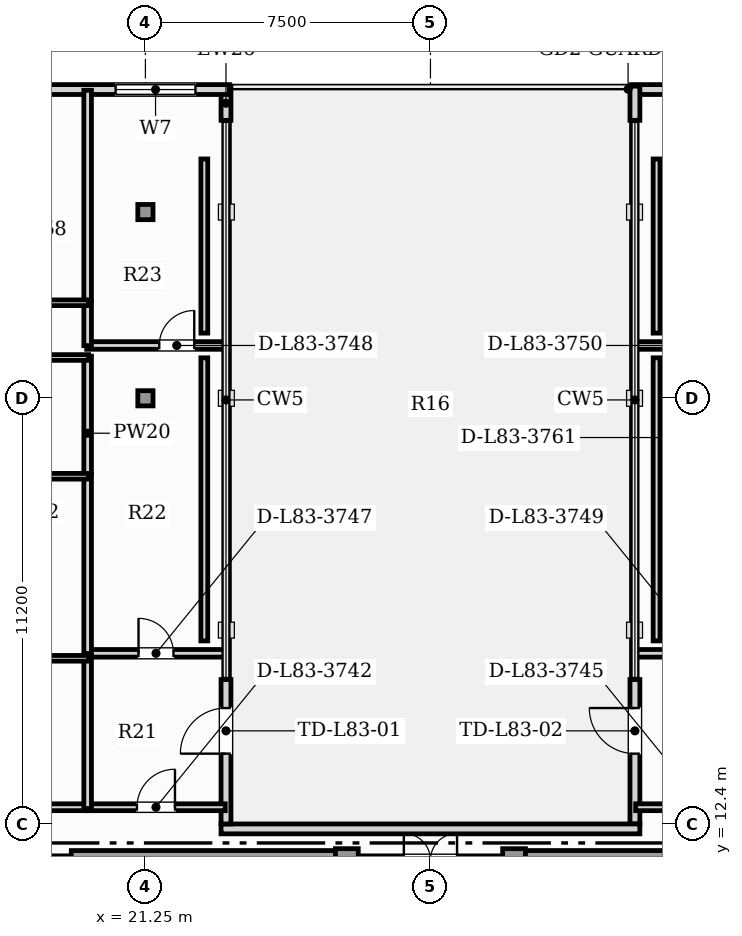
"""IFC4 building model, lengths in metres.
Left out: names, types, materials, properties, quantities, classifications, styles, units other than length and angle.
Written with IfcOpenShell. Run it as: python <this file> out.ifc"""

import sys

from ifc_helpers import new_model, si_unit, direction, frame, frame_2d, origin, origin_2d, place, context, subcontext, project, spatial, rectangle, hollow_rectangle, extrude, element, fill, save


model = new_model("IFC4")
c1 = context("Model", 3, precision=1e-05, world=origin(), true_north=direction((0.0, 1.0)))
c2 = subcontext(c1, "Body", "Model", "MODEL_VIEW")
j1 = project(units=[si_unit("LENGTHUNIT", "METRE"), si_unit("PLANEANGLEUNIT", "RADIAN")], contexts=[c1])
p1 = place(None, origin())
s1 = spatial("IfcSite", under=j1, at=p1, CompositionType="ELEMENT")
p2 = place(p1, origin())
s2 = spatial("IfcBuilding", under=s1, at=p2, CompositionType="ELEMENT")
p3 = place(p2, frame((0.0, 0.0, 337.5)))
s3 = spatial("IfcBuildingStorey", under=s2, at=p3, CompositionType="ELEMENT", Elevation=337.5)
for number, where, z_axis, x_axis in (
    (1, (19.3, 11.45, 0.0), (0.0, 0.0, 1.0), (1.0, 0.0, 0.0)),
    (2, (30.9, 11.45, 0.0), (0.0, 0.0, 1.0), (1.0, 0.0, 0.0)),
):
    element("IfcWall", number, at=place(p3, frame(where, z_axis=z_axis, x_axis=x_axis)), inside=s3, PredefinedType="SHEAR", context=c2, shape_type="SweptSolid", body=[
        extrude(rectangle(XDim=7.3, YDim=0.5, at=frame_2d((3.65, 0.0))), origin(), (0.0, 0.0, 1.0), 3.63),
    ])
for number, where, z_axis, x_axis in (
    (3, (26.55, 11.45, 0.0), (0.0, 0.0, 1.0), (1.0, 0.0, 0.0)),
    (4, (30.95, 11.45, 0.0), (0.0, 0.0, 1.0), (1.0, 0.0, 0.0)),
):
    element("IfcColumn", number, at=place(p3, frame(where, z_axis=z_axis, x_axis=x_axis)), inside=s3, PredefinedType="COLUMN", context=c2, shape_type="SweptSolid", body=[
        extrude(rectangle(XDim=0.6, YDim=0.6, at=origin_2d()), origin(), (0.0, 0.0, 1.0), 3.85),
    ])
for number, where, z_axis, x_axis in (
    (5, (21.25, 23.6, 0.0), (0.0, 0.0, 1.0), (1.0, 0.0, 0.0)),
    (6, (21.25, 28.5, 0.0), (0.0, 0.0, 1.0), (1.0, 0.0, 0.0)),
):
    element("IfcColumn", number, at=place(p3, frame(where, z_axis=z_axis, x_axis=x_axis)), inside=s3, PredefinedType="COLUMN", context=c2, shape_type="SweptSolid", body=[
        extrude(hollow_rectangle(XDim=0.4, YDim=0.4, WallThickness=0.02, at=origin_2d()), origin(), (0.0, 0.0, 1.0), 3.85),
    ])
p4 = place(p3, frame((44.912, 31.724, 0.0), z_axis=(0.0, 0.0, 1.0), x_axis=(-1.0, 0.0, 0.0)))
e7 = element("IfcWall", 7, at=p4, inside=s3, PredefinedType="SOLIDWALL", context=c2, shape_type="SweptSolid", body=[
    extrude(rectangle(XDim=10.872, YDim=0.26, at=frame_2d((5.436, 0.0))), origin(), (0.0, 0.0, 1.0), 3.63),
])
p5 = place(p4, frame((7.878, 0.0, 0.85)))
e8 = element("IfcOpeningElement", 8, at=p5, cuts=e7, PredefinedType="OPENING", context=c2, shape_type="SweptSolid", body=[
    extrude(rectangle(XDim=2.1, YDim=2.05, at=frame_2d((1.05, 1.025))), frame((0.0, 0.14, 0.0), z_axis=(0.0, -1.0, 0.0), x_axis=(1.0, 0.0, 0.0)), (0.0, 0.0, 1.0), 0.28),
])
p6 = place(p4, frame((4.502, 0.0, 0.9)))
e9 = element("IfcOpeningElement", 9, at=p6, cuts=e7, PredefinedType="OPENING", context=c2, shape_type="SweptSolid", body=[
    extrude(rectangle(XDim=1.5, YDim=1.95, at=frame_2d((0.75, 0.975))), frame((0.0, 0.14, 0.0), z_axis=(0.0, -1.0, 0.0), x_axis=(1.0, 0.0, 0.0)), (0.0, 0.0, 1.0), 0.28),
])
p7 = place(p4, frame((1.617, 0.0, 0.9)))
e10 = element("IfcOpeningElement", 10, at=p7, cuts=e7, PredefinedType="OPENING", context=c2, shape_type="SweptSolid", body=[
    extrude(rectangle(XDim=1.5, YDim=1.95, at=frame_2d((0.75, 0.975))), frame((0.0, 0.14, 0.0), z_axis=(0.0, -1.0, 0.0), x_axis=(1.0, 0.0, 0.0)), (0.0, 0.0, 1.0), 0.28),
])
p8 = place(p3, frame((34.13, 12.4, 0.0), z_axis=(0.0, 0.0, 1.0), x_axis=(0.0, 1.0, 0.0)))
e11 = element("IfcWall", 11, at=p8, inside=s3, PredefinedType="SOLIDWALL", context=c2, shape_type="SweptSolid", body=[
    extrude(rectangle(XDim=3.8, YDim=0.26, at=frame_2d((1.9, 0.0))), origin(), (0.0, 0.0, 1.0), 3.17),
])
p9 = place(p8, frame((1.85, 0.0, 0.0)))
e12 = element("IfcOpeningElement", 12, at=p9, cuts=e11, PredefinedType="OPENING", context=c2, shape_type="SweptSolid", body=[
    extrude(rectangle(XDim=1.2, YDim=2.2, at=frame_2d((0.6, 1.1))), frame((0.0, 0.14, 0.0), z_axis=(0.0, -1.0, 0.0), x_axis=(1.0, 0.0, 0.0)), (0.0, 0.0, 1.0), 0.28),
])
p10 = place(p3, frame((34.13, 30.914, 0.0), z_axis=(0.0, 0.0, 1.0), x_axis=(0.0, 1.0, 0.0)))
e13 = element("IfcWall", 13, at=p10, inside=s3, PredefinedType="SOLIDWALL", context=c2, shape_type="SweptSolid", body=[
    extrude(rectangle(XDim=0.9, YDim=0.26, at=frame_2d((0.45, 0.0))), origin(), (0.0, 0.0, 1.0), 3.63),
])
p11 = place(p3, frame((34.26, 12.27, 0.0), z_axis=(0.0, 0.0, 1.0), x_axis=(-1.0, 0.0, 0.0)))
e14 = element("IfcWall", 14, at=p11, inside=s3, PredefinedType="SOLIDWALL", context=c2, shape_type="SweptSolid", body=[
    extrude(rectangle(XDim=11.02, YDim=0.26, at=frame_2d((5.51, 0.0))), origin(), (0.0, 0.0, 1.0), 3.63),
])
p12 = place(p3, frame((23.37, 12.4, 0.0), z_axis=(0.0, 0.0, 1.0), x_axis=(0.0, 1.0, 0.0)))
e15 = element("IfcWall", 15, at=p12, inside=s3, PredefinedType="SOLIDWALL", context=c2, shape_type="SweptSolid", body=[
    extrude(rectangle(XDim=3.8, YDim=0.26, at=frame_2d((1.9, 0.0))), origin(), (0.0, 0.0, 1.0), 3.17),
])
p13 = place(p12, frame((1.85, 0.0, 0.0)))
e16 = element("IfcOpeningElement", 16, at=p13, cuts=e15, PredefinedType="OPENING", context=c2, shape_type="SweptSolid", body=[
    extrude(rectangle(XDim=1.2, YDim=2.2, at=frame_2d((0.6, 1.1))), frame((0.0, 0.14, 0.0), z_axis=(0.0, -1.0, 0.0), x_axis=(1.0, 0.0, 0.0)), (0.0, 0.0, 1.0), 0.28),
])
p14 = place(p3, frame((23.37, 30.914, 0.0), z_axis=(0.0, 0.0, 1.0), x_axis=(0.0, 1.0, 0.0)))
e17 = element("IfcWall", 17, at=p14, inside=s3, PredefinedType="SOLIDWALL", context=c2, shape_type="SweptSolid", body=[
    extrude(rectangle(XDim=0.9, YDim=0.26, at=frame_2d((0.45, 0.0))), origin(), (0.0, 0.0, 1.0), 3.63),
])
p15 = place(p3, frame((23.46, 31.724, 0.0), z_axis=(0.0, 0.0, 1.0), x_axis=(-1.0, 0.0, 0.0)))
e18 = element("IfcWall", 18, at=p15, inside=s3, PredefinedType="SOLIDWALL", context=c2, shape_type="SweptSolid", body=[
    extrude(rectangle(XDim=10.872, YDim=0.26, at=frame_2d((5.436, 0.0))), origin(), (0.0, 0.0, 1.0), 3.63),
])
p16 = place(p15, frame((0.893, 0.0, 0.85)))
e19 = element("IfcOpeningElement", 19, at=p16, cuts=e18, PredefinedType="OPENING", context=c2, shape_type="SweptSolid", body=[
    extrude(rectangle(XDim=2.1, YDim=2.05, at=frame_2d((1.05, 1.025))), frame((0.0, 0.14, 0.0), z_axis=(0.0, -1.0, 0.0), x_axis=(1.0, 0.0, 0.0)), (0.0, 0.0, 1.0), 0.28),
])
p17 = place(p15, frame((8.602, 0.0, 0.9)))
e20 = element("IfcOpeningElement", 20, at=p17, cuts=e18, PredefinedType="OPENING", context=c2, shape_type="SweptSolid", body=[
    extrude(rectangle(XDim=1.5, YDim=1.95, at=frame_2d((0.75, 0.975))), frame((0.0, 0.14, 0.0), z_axis=(0.0, -1.0, 0.0), x_axis=(1.0, 0.0, 0.0)), (0.0, 0.0, 1.0), 0.28),
])
p18 = place(p15, frame((6.336, 0.0, 0.9)))
e21 = element("IfcOpeningElement", 21, at=p18, cuts=e18, PredefinedType="OPENING", context=c2, shape_type="SweptSolid", body=[
    extrude(rectangle(XDim=0.9, YDim=1.4, at=frame_2d((0.45, 0.7))), frame((0.0, 0.14, 0.0), z_axis=(0.0, -1.0, 0.0), x_axis=(1.0, 0.0, 0.0)), (0.0, 0.0, 1.0), 0.28),
])
p19 = place(p3, frame((16.23, 11.45, 0.0), z_axis=(0.0, 0.0, 1.0), x_axis=(1.0, 0.0, 0.0)))
e22 = element("IfcWall", 22, at=p19, inside=s3, PredefinedType="SOLIDWALL", context=c2, shape_type="SweptSolid", body=[
    extrude(rectangle(XDim=3.04, YDim=0.22, at=frame_2d((1.52, 0.0))), origin(), (0.0, 0.0, 1.0), 3.63),
])
p20 = place(p19, frame((0.97, 0.0, 0.0)))
e23 = element("IfcOpeningElement", 23, at=p20, cuts=e22, PredefinedType="OPENING", context=c2, shape_type="SweptSolid", body=[
    extrude(rectangle(XDim=1.1, YDim=2.2, at=frame_2d((0.55, 1.1))), frame((0.0, 0.12, 0.0), z_axis=(0.0, -1.0, 0.0), x_axis=(1.0, 0.0, 0.0)), (0.0, 0.0, 1.0), 0.24),
])
p21 = place(p3, frame((26.63, 11.45, 0.0), z_axis=(0.0, 0.0, 1.0), x_axis=(1.0, 0.0, 0.0)))
e24 = element("IfcWall", 24, at=p21, inside=s3, PredefinedType="SOLIDWALL", context=c2, shape_type="SweptSolid", body=[
    extrude(rectangle(XDim=4.24, YDim=0.22, at=frame_2d((2.12, 0.0))), origin(), (0.0, 0.0, 1.0), 3.63),
])
p22 = place(p21, frame((1.42, 0.0, 0.0)))
e25 = element("IfcOpeningElement", 25, at=p22, cuts=e24, PredefinedType="OPENING", context=c2, shape_type="SweptSolid", body=[
    extrude(rectangle(XDim=1.4, YDim=2.2, at=frame_2d((0.7, 1.1))), frame((0.0, 0.12, 0.0), z_axis=(0.0, -1.0, 0.0), x_axis=(1.0, 0.0, 0.0)), (0.0, 0.0, 1.0), 0.24),
])
p23 = place(p3, frame((19.705, 12.84, 0.0), z_axis=(0.0, 0.0, 1.0), x_axis=(1.0, 0.0, 0.0)))
e26 = element("IfcWall", 26, at=p23, inside=s3, PredefinedType="PARTITIONING", context=c2, shape_type="SweptSolid", body=[
    extrude(rectangle(XDim=3.646, YDim=0.18, at=frame_2d((1.823, 0.0))), origin(), (0.0, 0.0, 1.0), 3.63),
])
p24 = place(p23, frame((1.323, 0.0, 0.0)))
e27 = element("IfcOpeningElement", 27, at=p24, cuts=e26, PredefinedType="OPENING", context=c2, shape_type="SweptSolid", body=[
    extrude(rectangle(XDim=1.0, YDim=2.15, at=frame_2d((0.5, 1.075))), frame((0.0, 0.1, 0.0), z_axis=(0.0, -1.0, 0.0), x_axis=(1.0, 0.0, 0.0)), (0.0, 0.0, 1.0), 0.2),
])
p25 = place(p3, frame((17.138, 12.84, 0.0), z_axis=(0.0, 0.0, 1.0), x_axis=(1.0, 0.0, 0.0)))
e28 = element("IfcWall", 28, at=p25, inside=s3, PredefinedType="PARTITIONING", context=c2, shape_type="SweptSolid", body=[
    extrude(rectangle(XDim=2.537, YDim=0.18, at=frame_2d((1.269, 0.0))), origin(), (0.0, 0.0, 1.0), 3.63),
])
p26 = place(p3, frame((34.149, 12.84, 0.0), z_axis=(0.0, 0.0, 1.0), x_axis=(1.0, 0.0, 0.0)))
e29 = element("IfcWall", 29, at=p26, inside=s3, PredefinedType="PARTITIONING", context=c2, shape_type="SweptSolid", body=[
    extrude(rectangle(XDim=3.646, YDim=0.18, at=frame_2d((1.823, 0.0))), origin(), (0.0, 0.0, 1.0), 3.63),
])
p27 = place(p26, frame((1.323, 0.0, 0.0)))
e30 = element("IfcOpeningElement", 30, at=p27, cuts=e29, PredefinedType="OPENING", context=c2, shape_type="SweptSolid", body=[
    extrude(rectangle(XDim=1.0, YDim=2.15, at=frame_2d((0.5, 1.075))), frame((0.0, 0.1, 0.0), z_axis=(0.0, -1.0, 0.0), x_axis=(1.0, 0.0, 0.0)), (0.0, 0.0, 1.0), 0.2),
])
p28 = place(p3, frame((19.705, 16.89, 0.0), z_axis=(0.0, 0.0, 1.0), x_axis=(1.0, 0.0, 0.0)))
e31 = element("IfcWall", 31, at=p28, inside=s3, PredefinedType="PARTITIONING", context=c2, shape_type="SweptSolid", body=[
    extrude(rectangle(XDim=3.647, YDim=0.2, at=frame_2d((1.823, 0.0))), origin(), (0.0, 0.0, 1.0), 3.63),
])
p29 = place(p28, frame((1.364, 0.0, 0.0)))
e32 = element("IfcOpeningElement", 32, at=p29, cuts=e31, PredefinedType="OPENING", context=c2, shape_type="SweptSolid", body=[
    extrude(rectangle(XDim=0.92, YDim=2.1, at=frame_2d((0.46, 1.05))), frame((0.0, 0.11, 0.0), z_axis=(0.0, -1.0, 0.0), x_axis=(1.0, 0.0, 0.0)), (0.0, 0.0, 1.0), 0.22),
])
p30 = place(p3, frame((19.73, 12.805, 0.0), z_axis=(0.0, 0.0, 1.0), x_axis=(0.0, 1.0, 0.0)))
e33 = element("IfcWall", 33, at=p30, inside=s3, PredefinedType="PARTITIONING", context=c2, shape_type="SweptSolid", body=[
    extrude(rectangle(XDim=3.989, YDim=0.2, at=frame_2d((1.995, 0.0))), origin(), (0.0, 0.0, 1.0), 3.63),
])
p31 = place(p3, frame((19.705, 24.99, 0.0), z_axis=(0.0, 0.0, 1.0), x_axis=(1.0, 0.0, 0.0)))
e34 = element("IfcWall", 34, at=p31, inside=s3, PredefinedType="PARTITIONING", context=c2, shape_type="SweptSolid", body=[
    extrude(rectangle(XDim=3.646, YDim=0.2, at=frame_2d((1.823, 0.0))), origin(), (0.0, 0.0, 1.0), 3.63),
])
p32 = place(p31, frame((1.91, 0.0, 0.0)))
e35 = element("IfcOpeningElement", 35, at=p32, cuts=e34, PredefinedType="OPENING", context=c2, shape_type="SweptSolid", body=[
    extrude(rectangle(XDim=0.92, YDim=2.1, at=frame_2d((0.46, 1.05))), frame((0.0, 0.11, 0.0), z_axis=(0.0, -1.0, 0.0), x_axis=(1.0, 0.0, 0.0)), (0.0, 0.0, 1.0), 0.22),
])
p33 = place(p3, frame((19.73, 16.885, 0.0), z_axis=(0.0, 0.0, 1.0), x_axis=(0.0, 1.0, 0.0)))
e36 = element("IfcWall", 36, at=p33, inside=s3, PredefinedType="PARTITIONING", context=c2, shape_type="SweptSolid", body=[
    extrude(rectangle(XDim=4.698, YDim=0.2, at=frame_2d((2.349, 0.0))), origin(), (0.0, 0.0, 1.0), 3.63),
])
p34 = place(p3, frame((19.73, 21.614, 0.0), z_axis=(0.0, 0.0, 1.0), x_axis=(0.0, 1.0, 0.0)))
e37 = element("IfcWall", 37, at=p34, inside=s3, PredefinedType="PARTITIONING", context=c2, shape_type="SweptSolid", body=[
    extrude(rectangle(XDim=3.095, YDim=0.2, at=frame_2d((1.548, 0.0))), origin(), (0.0, 0.0, 1.0), 3.63),
])
p35 = place(p3, frame((19.73, 24.985, 0.0), z_axis=(0.0, 0.0, 1.0), x_axis=(0.0, 1.0, 0.0)))
e38 = element("IfcWall", 38, at=p35, inside=s3, PredefinedType="PARTITIONING", context=c2, shape_type="SweptSolid", body=[
    extrude(rectangle(XDim=1.164, YDim=0.2, at=frame_2d((0.582, 0.0))), origin(), (0.0, 0.0, 1.0), 3.63),
])
p36 = place(p3, frame((19.73, 26.179, 0.0), z_axis=(0.0, 0.0, 1.0), x_axis=(0.0, 1.0, 0.0)))
e39 = element("IfcWall", 39, at=p36, inside=s3, PredefinedType="PARTITIONING", context=c2, shape_type="SweptSolid", body=[
    extrude(rectangle(XDim=5.526, YDim=0.2, at=frame_2d((2.763, 0.0))), origin(), (0.0, 0.0, 1.0), 3.63),
])
p37 = place(p3, frame((34.148, 16.89, 0.0), z_axis=(0.0, 0.0, 1.0), x_axis=(1.0, 0.0, 0.0)))
e40 = element("IfcWall", 40, at=p37, inside=s3, PredefinedType="PARTITIONING", context=c2, shape_type="SweptSolid", body=[
    extrude(rectangle(XDim=3.647, YDim=0.2, at=frame_2d((1.823, 0.0))), origin(), (0.0, 0.0, 1.0), 3.63),
])
p38 = place(p37, frame((1.364, 0.0, 0.0)))
e41 = element("IfcOpeningElement", 41, at=p38, cuts=e40, PredefinedType="OPENING", context=c2, shape_type="SweptSolid", body=[
    extrude(rectangle(XDim=0.92, YDim=2.1, at=frame_2d((0.46, 1.05))), frame((0.0, 0.11, 0.0), z_axis=(0.0, -1.0, 0.0), x_axis=(1.0, 0.0, 0.0)), (0.0, 0.0, 1.0), 0.22),
])
p39 = place(p3, frame((34.149, 24.99, 0.0), z_axis=(0.0, 0.0, 1.0), x_axis=(1.0, 0.0, 0.0)))
e42 = element("IfcWall", 42, at=p39, inside=s3, PredefinedType="PARTITIONING", context=c2, shape_type="SweptSolid", body=[
    extrude(rectangle(XDim=3.646, YDim=0.2, at=frame_2d((1.823, 0.0))), origin(), (0.0, 0.0, 1.0), 3.63),
])
p40 = place(p39, frame((0.816, 0.0, 0.0)))
e43 = element("IfcOpeningElement", 43, at=p40, cuts=e42, PredefinedType="OPENING", context=c2, shape_type="SweptSolid", body=[
    extrude(rectangle(XDim=0.92, YDim=2.1, at=frame_2d((0.46, 1.05))), frame((0.0, 0.11, 0.0), z_axis=(0.0, -1.0, 0.0), x_axis=(1.0, 0.0, 0.0)), (0.0, 0.0, 1.0), 0.22),
])
p41 = place(p3, frame((17.038, 24.674, 0.0), z_axis=(0.0, 0.0, 1.0), x_axis=(1.0, 0.0, 0.0)))
e44 = element("IfcWall", 44, at=p41, inside=s3, PredefinedType="PARTITIONING", context=c2, shape_type="SweptSolid", body=[
    extrude(rectangle(XDim=2.717, YDim=0.15, at=frame_2d((1.358, 0.0))), origin(), (0.0, 0.0, 1.0), 3.63),
])
p42 = place(p3, frame((15.557, 26.114, 0.0), z_axis=(0.0, 0.0, 1.0), x_axis=(1.0, 0.0, 0.0)))
e45 = element("IfcWall", 45, at=p42, inside=s3, PredefinedType="PARTITIONING", context=c2, shape_type="SweptSolid", body=[
    extrude(rectangle(XDim=4.198, YDim=0.15, at=frame_2d((2.099, 0.0))), origin(), (0.0, 0.0, 1.0), 3.63),
])
p43 = place(p42, frame((1.639, 0.0, 0.0)))
e46 = element("IfcOpeningElement", 46, at=p43, cuts=e45, PredefinedType="OPENING", context=c2, shape_type="SweptSolid", body=[
    extrude(rectangle(XDim=0.92, YDim=2.1, at=frame_2d((0.46, 1.05))), frame((0.0, 0.085, 0.0), z_axis=(0.0, -1.0, 0.0), x_axis=(1.0, 0.0, 0.0)), (0.0, 0.0, 1.0), 0.17),
])
for number, where, z_axis, x_axis in (
    (47, (17.038, 16.759, 0.0), (0.0, 0.0, 1.0), (1.0, 0.0, 0.0)),
    (48, (17.038, 21.549, 0.0), (0.0, 0.0, 1.0), (1.0, 0.0, 0.0)),
):
    element("IfcWall", number, at=place(p3, frame(where, z_axis=z_axis, x_axis=x_axis)), inside=s3, PredefinedType="PARTITIONING", context=c2, shape_type="SweptSolid", body=[
        extrude(rectangle(XDim=2.717, YDim=0.15, at=frame_2d((1.358, 0.0))), origin(), (0.0, 0.0, 1.0), 3.63),
    ])
p44 = place(p3, frame((22.8, 24.665, 0.0), z_axis=(0.0, 0.0, 1.0), x_axis=(0.0, -1.0, 0.0)))
e49 = element("IfcWall", 49, at=p44, inside=s3, PredefinedType="PARTITIONING", context=c2, shape_type="SweptSolid", body=[
    extrude(rectangle(XDim=7.448, YDim=0.18, at=frame_2d((3.724, 0.0))), origin(), (0.0, 0.0, 1.0), 3.63),
])
p45 = place(p3, frame((22.8, 29.897, 0.0), z_axis=(0.0, 0.0, 1.0), x_axis=(0.0, -1.0, 0.0)))
e50 = element("IfcWall", 50, at=p45, inside=s3, PredefinedType="PARTITIONING", context=c2, shape_type="SweptSolid", body=[
    extrude(rectangle(XDim=4.582, YDim=0.18, at=frame_2d((2.291, 0.0))), origin(), (0.0, 0.0, 1.0), 3.63),
])
p46 = place(p3, frame((34.7, 17.217, 0.0), z_axis=(0.0, 0.0, 1.0), x_axis=(0.0, 1.0, 0.0)))
e51 = element("IfcWall", 51, at=p46, inside=s3, PredefinedType="PARTITIONING", context=c2, shape_type="SweptSolid", body=[
    extrude(rectangle(XDim=7.448, YDim=0.18, at=frame_2d((3.724, 0.0))), origin(), (0.0, 0.0, 1.0), 3.63),
])
p47 = place(p3, frame((34.7, 25.315, 0.0), z_axis=(0.0, 0.0, 1.0), x_axis=(0.0, 1.0, 0.0)))
e52 = element("IfcWall", 52, at=p47, inside=s3, PredefinedType="PARTITIONING", context=c2, shape_type="SweptSolid", body=[
    extrude(rectangle(XDim=4.582, YDim=0.18, at=frame_2d((2.291, 0.0))), origin(), (0.0, 0.0, 1.0), 3.63),
])
p48 = place(p9, origin())
e53 = element("IfcDoor", 53, at=p48, inside=s3, OperationType="SINGLE_SWING_RIGHT", PredefinedType="DOOR", context=c2, shape_type="SweptSolid", body=[
    extrude(rectangle(XDim=1.2, YDim=2.2, at=frame_2d((0.6, 1.1))), frame((0.0, 0.025, 0.0), z_axis=(0.0, -1.0, 0.0), x_axis=(1.0, 0.0, 0.0)), (0.0, 0.0, 1.0), 0.05),
])
fill(e12, e53)
p49 = place(p13, origin())
e54 = element("IfcDoor", 54, at=p49, inside=s3, OperationType="SINGLE_SWING_LEFT", PredefinedType="DOOR", context=c2, shape_type="SweptSolid", body=[
    extrude(rectangle(XDim=1.2, YDim=2.2, at=frame_2d((0.6, 1.1))), frame((0.0, 0.025, 0.0), z_axis=(0.0, -1.0, 0.0), x_axis=(1.0, 0.0, 0.0)), (0.0, 0.0, 1.0), 0.05),
])
fill(e16, e54)
p50 = place(p16, origin())
e55 = element("IfcWindow", 55, at=p50, inside=s3, PartitioningType="SINGLE_PANEL", PredefinedType="WINDOW", context=c2, shape_type="SweptSolid", body=[
    extrude(rectangle(XDim=2.1, YDim=2.05, at=frame_2d((1.05, 1.025))), frame((0.0, 0.03, 0.0), z_axis=(0.0, -1.0, 0.0), x_axis=(1.0, 0.0, 0.0)), (0.0, 0.0, 1.0), 0.06),
])
fill(e19, e55)
p51 = place(p24, origin())
e56 = element("IfcDoor", 56, at=p51, inside=s3, OperationType="SINGLE_SWING_RIGHT", PredefinedType="DOOR", context=c2, shape_type="SweptSolid", body=[
    extrude(rectangle(XDim=1.0, YDim=2.15, at=frame_2d((0.5, 1.075))), frame((0.0, 0.025, 0.0), z_axis=(0.0, -1.0, 0.0), x_axis=(1.0, 0.0, 0.0)), (0.0, 0.0, 1.0), 0.05),
])
fill(e27, e56)
p52 = place(p29, origin())
e57 = element("IfcDoor", 57, at=p52, inside=s3, OperationType="SINGLE_SWING_LEFT", PredefinedType="DOOR", context=c2, shape_type="SweptSolid", body=[
    extrude(rectangle(XDim=0.92, YDim=2.1, at=frame_2d((0.46, 1.05))), frame((0.0, 0.025, 0.0), z_axis=(0.0, -1.0, 0.0), x_axis=(1.0, 0.0, 0.0)), (0.0, 0.0, 1.0), 0.05),
])
fill(e32, e57)
p53 = place(p32, origin())
e58 = element("IfcDoor", 58, at=p53, inside=s3, OperationType="SINGLE_SWING_RIGHT", PredefinedType="DOOR", context=c2, shape_type="SweptSolid", body=[
    extrude(rectangle(XDim=0.92, YDim=2.1, at=frame_2d((0.46, 1.05))), frame((0.0, 0.025, 0.0), z_axis=(0.0, -1.0, 0.0), x_axis=(1.0, 0.0, 0.0)), (0.0, 0.0, 1.0), 0.05),
])
fill(e35, e58)
save(model, sys.argv[1])
